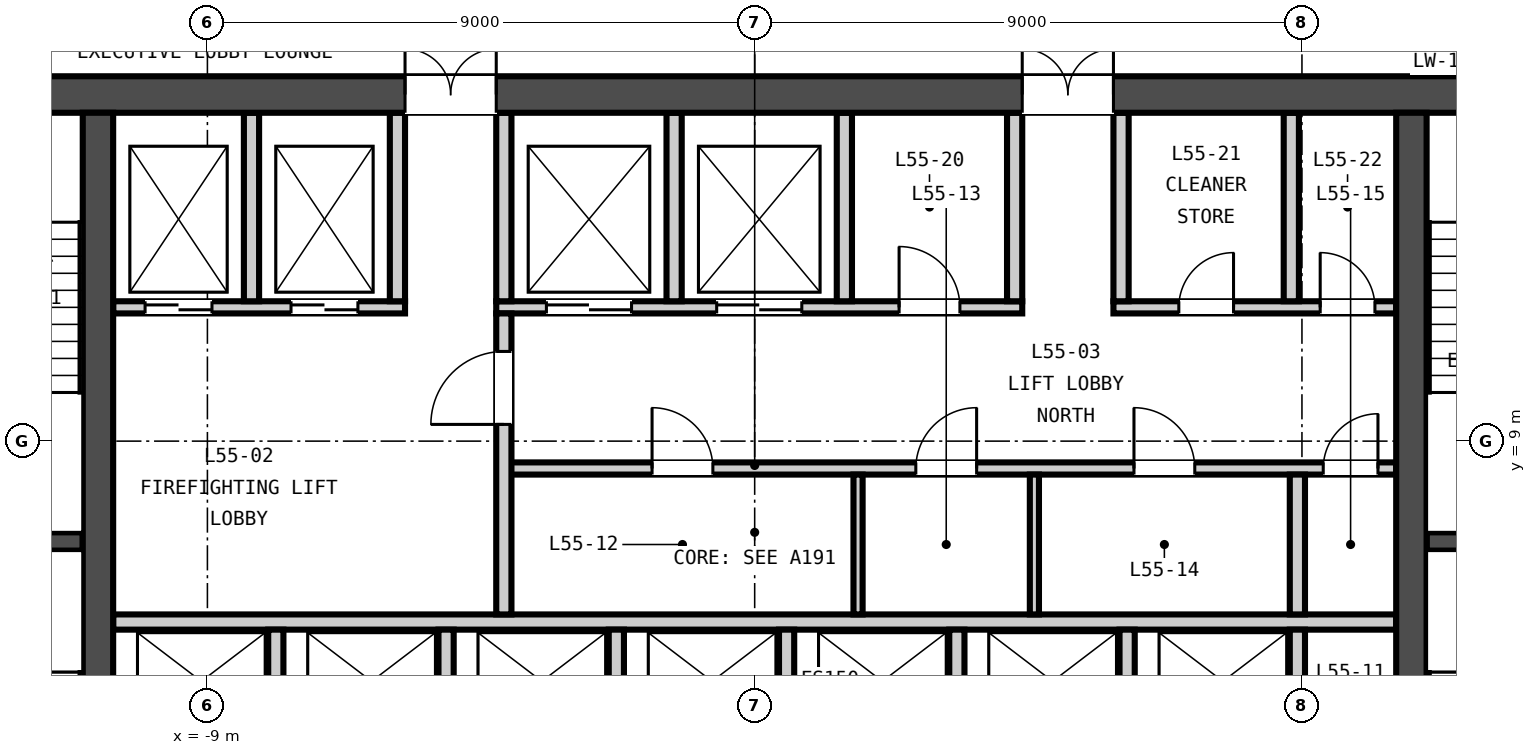
"""IFC4 building model, lengths in metres.
Left out: names, types, materials, properties, quantities, classifications, styles, units other than length and angle.
Written with IfcOpenShell. Run it as: python <this file> out.ifc"""

import sys

from ifc_helpers import new_model, si_unit, direction, frame, frame_2d, origin, place, context, subcontext, project, spatial, rectangle, extrude, element, fill, save


model = new_model("IFC4")
c1 = context("Model", 3, precision=1e-05, world=origin(), true_north=direction((0.0, 1.0)))
c2 = subcontext(c1, "Body", "Model", "MODEL_VIEW")
j1 = project(units=[si_unit("LENGTHUNIT", "METRE"), si_unit("PLANEANGLEUNIT", "RADIAN")], contexts=[c1])
p1 = place(None, origin())
s1 = spatial("IfcSite", under=j1, at=p1, CompositionType="ELEMENT")
p2 = place(p1, origin())
s2 = spatial("IfcBuilding", under=s1, at=p2, CompositionType="ELEMENT")
p3 = place(p2, frame((0.0, 0.0, 219.95)))
s3 = spatial("IfcBuildingStorey", under=s2, at=p3, CompositionType="ELEMENT", Elevation=219.95)
p4 = place(p3, frame((-15.0, 14.7, -0.15), z_axis=(0.0, 0.0, 1.0), x_axis=(1.0, 0.0, 0.0)))
e1 = element("IfcWall", 1, at=p4, inside=s3, PredefinedType="SOLIDWALL", context=c2, shape_type="SweptSolid", body=[
    extrude(rectangle(XDim=30.0, YDim=0.6, at=frame_2d((15.0, 0.0))), origin(), (0.0, 0.0, 1.0), 3.65),
])
p5 = place(p4, frame((9.25, 0.0, 0.15)))
e2 = element("IfcOpeningElement", 2, at=p5, cuts=e1, PredefinedType="OPENING", context=c2, shape_type="SweptSolid", body=[
    extrude(rectangle(XDim=1.5, YDim=2.1, at=frame_2d((0.75, 1.05))), frame((0.0, 0.31, 0.0), z_axis=(0.0, -1.0, 0.0), x_axis=(1.0, 0.0, 0.0)), (0.0, 0.0, 1.0), 0.62),
])
p6 = place(p4, frame((19.4, 0.0, 0.15)))
e3 = element("IfcOpeningElement", 3, at=p6, cuts=e1, PredefinedType="OPENING", context=c2, shape_type="SweptSolid", body=[
    extrude(rectangle(XDim=1.5, YDim=2.1, at=frame_2d((0.75, 1.05))), frame((0.0, 0.31, 0.0), z_axis=(0.0, -1.0, 0.0), x_axis=(1.0, 0.0, 0.0)), (0.0, 0.0, 1.0), 0.62),
])
p7 = place(p4, frame((1.5, 0.0, 0.15)))
e4 = element("IfcOpeningElement", 4, at=p7, cuts=e1, PredefinedType="OPENING", context=c2, shape_type="SweptSolid", body=[
    extrude(rectangle(XDim=1.2, YDim=2.1, at=frame_2d((0.6, 1.05))), frame((0.0, 0.31, 0.0), z_axis=(0.0, -1.0, 0.0), x_axis=(1.0, 0.0, 0.0)), (0.0, 0.0, 1.0), 0.62),
])
p8 = place(p4, frame((27.3, 0.0, 0.15)))
e5 = element("IfcOpeningElement", 5, at=p8, cuts=e1, PredefinedType="OPENING", context=c2, shape_type="SweptSolid", body=[
    extrude(rectangle(XDim=1.2, YDim=2.1, at=frame_2d((0.6, 1.05))), frame((0.0, 0.31, 0.0), z_axis=(0.0, -1.0, 0.0), x_axis=(1.0, 0.0, 0.0)), (0.0, 0.0, 1.0), 0.62),
])
for number, where, z_axis, x_axis in (
    (6, (-10.8, 0.6, -0.15), (0.0, 0.0, 1.0), (0.0, 1.0, 0.0)),
    (7, (10.8, 0.6, -0.15), (0.0, 0.0, 1.0), (0.0, 1.0, 0.0)),
):
    element("IfcWall", number, at=place(p3, frame(where, z_axis=z_axis, x_axis=x_axis)), inside=s3, PredefinedType="SOLIDWALL", context=c2, shape_type="SweptSolid", body=[
        extrude(rectangle(XDim=13.8, YDim=0.5, at=frame_2d((6.9, 0.0))), origin(), (0.0, 0.0, 1.0), 3.65),
    ])
p9 = place(p3, frame((-10.55, 6.025, 0.0), z_axis=(0.0, 0.0, 1.0), x_axis=(1.0, 0.0, 0.0)))
e8 = element("IfcWall", 8, at=p9, inside=s3, PredefinedType="PARTITIONING", context=c2, shape_type="SweptSolid", body=[
    extrude(rectangle(XDim=21.1, YDim=0.25, at=frame_2d((10.55, 0.0))), origin(), (0.0, 0.0, 1.0), 3.5),
])
p10 = place(p3, frame((-4.125, 8.55, 0.0), z_axis=(0.0, 0.0, 1.0), x_axis=(1.0, 0.0, 0.0)))
e9 = element("IfcWall", 9, at=p10, inside=s3, PredefinedType="PARTITIONING", context=c2, shape_type="SweptSolid", body=[
    extrude(rectangle(XDim=14.675, YDim=0.2, at=frame_2d((7.337, 0.0))), origin(), (0.0, 0.0, 1.0), 3.5),
])
p11 = place(p10, frame((2.438, 0.0, 0.0)))
e10 = element("IfcOpeningElement", 10, at=p11, cuts=e9, PredefinedType="OPENING", context=c2, shape_type="SweptSolid", body=[
    extrude(rectangle(XDim=1.0, YDim=2.1, at=frame_2d((0.5, 1.05))), frame((0.0, 0.11, 0.0), z_axis=(0.0, -1.0, 0.0), x_axis=(1.0, 0.0, 0.0)), (0.0, 0.0, 1.0), 0.22),
])
p12 = place(p10, frame((6.775, 0.0, 0.0)))
e11 = element("IfcOpeningElement", 11, at=p12, cuts=e9, PredefinedType="OPENING", context=c2, shape_type="SweptSolid", body=[
    extrude(rectangle(XDim=1.0, YDim=2.1, at=frame_2d((0.5, 1.05))), frame((0.0, 0.11, 0.0), z_axis=(0.0, -1.0, 0.0), x_axis=(1.0, 0.0, 0.0)), (0.0, 0.0, 1.0), 0.22),
])
p13 = place(p10, frame((10.363, 0.0, 0.0)))
e12 = element("IfcOpeningElement", 12, at=p13, cuts=e9, PredefinedType="OPENING", context=c2, shape_type="SweptSolid", body=[
    extrude(rectangle(XDim=1.0, YDim=2.1, at=frame_2d((0.5, 1.05))), frame((0.0, 0.11, 0.0), z_axis=(0.0, -1.0, 0.0), x_axis=(1.0, 0.0, 0.0)), (0.0, 0.0, 1.0), 0.22),
])
p14 = place(p10, frame((13.475, 0.0, 0.0)))
e13 = element("IfcOpeningElement", 13, at=p14, cuts=e9, PredefinedType="OPENING", context=c2, shape_type="SweptSolid", body=[
    extrude(rectangle(XDim=0.9, YDim=2.1, at=frame_2d((0.45, 1.05))), frame((0.0, 0.11, 0.0), z_axis=(0.0, -1.0, 0.0), x_axis=(1.0, 0.0, 0.0)), (0.0, 0.0, 1.0), 0.22),
])
p15 = place(p3, frame((-10.55, 11.2, 0.0), z_axis=(0.0, 0.0, 1.0), x_axis=(1.0, 0.0, 0.0)))
e14 = element("IfcWall", 14, at=p15, inside=s3, PredefinedType="PARTITIONING", context=c2, shape_type="SweptSolid", body=[
    extrude(rectangle(XDim=4.8, YDim=0.2, at=frame_2d((2.4, 0.0))), origin(), (0.0, 0.0, 1.0), 3.5),
])
p16 = place(p15, frame((0.525, 0.0, 0.0)))
e15 = element("IfcOpeningElement", 15, at=p16, cuts=e14, PredefinedType="OPENING", context=c2, shape_type="SweptSolid", body=[
    extrude(rectangle(XDim=1.1, YDim=2.1, at=frame_2d((0.55, 1.05))), frame((0.0, 0.11, 0.0), z_axis=(0.0, -1.0, 0.0), x_axis=(1.0, 0.0, 0.0)), (0.0, 0.0, 1.0), 0.22),
])
p17 = place(p15, frame((2.925, 0.0, 0.0)))
e16 = element("IfcOpeningElement", 16, at=p17, cuts=e14, PredefinedType="OPENING", context=c2, shape_type="SweptSolid", body=[
    extrude(rectangle(XDim=1.1, YDim=2.1, at=frame_2d((0.55, 1.05))), frame((0.0, 0.11, 0.0), z_axis=(0.0, -1.0, 0.0), x_axis=(1.0, 0.0, 0.0)), (0.0, 0.0, 1.0), 0.22),
])
p18 = place(p3, frame((-4.25, 11.2, 0.0), z_axis=(0.0, 0.0, 1.0), x_axis=(1.0, 0.0, 0.0)))
e17 = element("IfcWall", 17, at=p18, inside=s3, PredefinedType="PARTITIONING", context=c2, shape_type="SweptSolid", body=[
    extrude(rectangle(XDim=8.65, YDim=0.2, at=frame_2d((4.325, 0.0))), origin(), (0.0, 0.0, 1.0), 3.5),
])
p19 = place(p18, frame((0.825, 0.0, 0.0)))
e18 = element("IfcOpeningElement", 18, at=p19, cuts=e17, PredefinedType="OPENING", context=c2, shape_type="SweptSolid", body=[
    extrude(rectangle(XDim=1.4, YDim=2.1, at=frame_2d((0.7, 1.05))), frame((0.0, 0.11, 0.0), z_axis=(0.0, -1.0, 0.0), x_axis=(1.0, 0.0, 0.0)), (0.0, 0.0, 1.0), 0.22),
])
p20 = place(p18, frame((3.625, 0.0, 0.0)))
e19 = element("IfcOpeningElement", 19, at=p20, cuts=e17, PredefinedType="OPENING", context=c2, shape_type="SweptSolid", body=[
    extrude(rectangle(XDim=1.4, YDim=2.1, at=frame_2d((0.7, 1.05))), frame((0.0, 0.11, 0.0), z_axis=(0.0, -1.0, 0.0), x_axis=(1.0, 0.0, 0.0)), (0.0, 0.0, 1.0), 0.22),
])
p21 = place(p18, frame((6.625, 0.0, 0.0)))
e20 = element("IfcOpeningElement", 20, at=p21, cuts=e17, PredefinedType="OPENING", context=c2, shape_type="SweptSolid", body=[
    extrude(rectangle(XDim=1.0, YDim=2.1, at=frame_2d((0.5, 1.05))), frame((0.0, 0.11, 0.0), z_axis=(0.0, -1.0, 0.0), x_axis=(1.0, 0.0, 0.0)), (0.0, 0.0, 1.0), 0.22),
])
p22 = place(p3, frame((5.9, 11.2, 0.0), z_axis=(0.0, 0.0, 1.0), x_axis=(1.0, 0.0, 0.0)))
e21 = element("IfcWall", 21, at=p22, inside=s3, PredefinedType="PARTITIONING", context=c2, shape_type="SweptSolid", body=[
    extrude(rectangle(XDim=4.65, YDim=0.2, at=frame_2d((2.325, 0.0))), origin(), (0.0, 0.0, 1.0), 3.5),
])
p23 = place(p22, frame((1.075, 0.0, 0.0)))
e22 = element("IfcOpeningElement", 22, at=p23, cuts=e21, PredefinedType="OPENING", context=c2, shape_type="SweptSolid", body=[
    extrude(rectangle(XDim=0.9, YDim=2.1, at=frame_2d((0.45, 1.05))), frame((0.0, 0.11, 0.0), z_axis=(0.0, -1.0, 0.0), x_axis=(1.0, 0.0, 0.0)), (0.0, 0.0, 1.0), 0.22),
])
p24 = place(p22, frame((3.4, 0.0, 0.0)))
e23 = element("IfcOpeningElement", 23, at=p24, cuts=e21, PredefinedType="OPENING", context=c2, shape_type="SweptSolid", body=[
    extrude(rectangle(XDim=0.9, YDim=2.1, at=frame_2d((0.45, 1.05))), frame((0.0, 0.11, 0.0), z_axis=(0.0, -1.0, 0.0), x_axis=(1.0, 0.0, 0.0)), (0.0, 0.0, 1.0), 0.22),
])
p25 = place(p3, frame((-4.125, 6.15, 0.0), z_axis=(0.0, 0.0, 1.0), x_axis=(0.0, 1.0, 0.0)))
e24 = element("IfcWall", 24, at=p25, inside=s3, PredefinedType="PARTITIONING", context=c2, shape_type="SweptSolid", body=[
    extrude(rectangle(XDim=4.95, YDim=0.25, at=frame_2d((2.475, 0.0))), origin(), (0.0, 0.0, 1.0), 3.5),
])
p26 = place(p25, frame((3.125, 0.0, 0.0)))
e25 = element("IfcOpeningElement", 25, at=p26, cuts=e24, PredefinedType="OPENING", context=c2, shape_type="SweptSolid", body=[
    extrude(rectangle(XDim=1.2, YDim=2.1, at=frame_2d((0.6, 1.05))), frame((0.0, 0.135, 0.0), z_axis=(0.0, -1.0, 0.0), x_axis=(1.0, 0.0, 0.0)), (0.0, 0.0, 1.0), 0.27),
])
for number, where, z_axis, x_axis in (
    (26, (-7.875, 3.6, 0.0), (0.0, 0.0, 1.0), (0.0, 1.0, 0.0)),
    (27, (-5.075, 3.6, 0.0), (0.0, 0.0, 1.0), (0.0, 1.0, 0.0)),
    (28, (-2.275, 3.6, 0.0), (0.0, 0.0, 1.0), (0.0, 1.0, 0.0)),
    (29, (0.525, 3.6, 0.0), (0.0, 0.0, 1.0), (0.0, 1.0, 0.0)),
    (30, (3.325, 3.6, 0.0), (0.0, 0.0, 1.0), (0.0, 1.0, 0.0)),
    (31, (6.125, 3.6, 0.0), (0.0, 0.0, 1.0), (0.0, 1.0, 0.0)),
    (32, (8.925, 3.6, 0.0), (0.0, 0.0, 1.0), (0.0, 1.0, 0.0)),
):
    element("IfcWall", number, at=place(p3, frame(where, z_axis=z_axis, x_axis=x_axis)), inside=s3, PredefinedType="PARTITIONING", context=c2, shape_type="SweptSolid", body=[
        extrude(rectangle(XDim=2.3, YDim=0.25, at=frame_2d((1.15, 0.0))), origin(), (0.0, 0.0, 1.0), 3.5),
    ])
for number, where, z_axis, x_axis in (
    (33, (1.7, 6.15, 0.0), (0.0, 0.0, 1.0), (0.0, 1.0, 0.0)),
    (34, (4.6, 6.15, 0.0), (0.0, 0.0, 1.0), (0.0, 1.0, 0.0)),
):
    element("IfcWall", number, at=place(p3, frame(where, z_axis=z_axis, x_axis=x_axis)), inside=s3, PredefinedType="PARTITIONING", context=c2, shape_type="SweptSolid", body=[
        extrude(rectangle(XDim=2.3, YDim=0.15, at=frame_2d((1.15, 0.0))), origin(), (0.0, 0.0, 1.0), 3.5),
    ])
p27 = place(p3, frame((8.925, 6.15, 0.0), z_axis=(0.0, 0.0, 1.0), x_axis=(0.0, 1.0, 0.0)))
e35 = element("IfcWall", 35, at=p27, inside=s3, PredefinedType="PARTITIONING", context=c2, shape_type="SweptSolid", body=[
    extrude(rectangle(XDim=2.3, YDim=0.25, at=frame_2d((1.15, 0.0))), origin(), (0.0, 0.0, 1.0), 3.5),
])
for number, where, z_axis, x_axis in (
    (36, (-8.275, 11.3, 0.0), (0.0, 0.0, 1.0), (0.0, 1.0, 0.0)),
    (37, (-5.875, 11.3, 0.0), (0.0, 0.0, 1.0), (0.0, 1.0, 0.0)),
    (38, (-4.125, 11.3, 0.0), (0.0, 0.0, 1.0), (0.0, 1.0, 0.0)),
    (39, (-1.325, 11.3, 0.0), (0.0, 0.0, 1.0), (0.0, 1.0, 0.0)),
    (40, (1.475, 11.3, 0.0), (0.0, 0.0, 1.0), (0.0, 1.0, 0.0)),
    (41, (4.275, 11.3, 0.0), (0.0, 0.0, 1.0), (0.0, 1.0, 0.0)),
    (42, (6.025, 11.3, 0.0), (0.0, 0.0, 1.0), (0.0, 1.0, 0.0)),
    (43, (8.825, 11.3, 0.0), (0.0, 0.0, 1.0), (0.0, 1.0, 0.0)),
):
    element("IfcWall", number, at=place(p3, frame(where, z_axis=z_axis, x_axis=x_axis)), inside=s3, PredefinedType="PARTITIONING", context=c2, shape_type="SweptSolid", body=[
        extrude(rectangle(XDim=3.1, YDim=0.25, at=frame_2d((1.55, 0.0))), origin(), (0.0, 0.0, 1.0), 3.5),
    ])
for number, where, z_axis, x_axis in (
    (44, (-14.0, 7.35, 0.0), (0.0, 0.0, 1.0), (1.0, 0.0, 0.0)),
    (45, (11.05, 7.35, 0.0), (0.0, 0.0, 1.0), (1.0, 0.0, 0.0)),
):
    element("IfcWall", number, at=place(p3, frame(where, z_axis=z_axis, x_axis=x_axis)), inside=s3, PredefinedType="SOLIDWALL", context=c2, shape_type="SweptSolid", body=[
        extrude(rectangle(XDim=2.95, YDim=0.3, at=frame_2d((1.475, 0.0))), origin(), (0.0, 0.0, 1.0), 3.5),
    ])
p28 = place(p26, origin())
e46 = element("IfcDoor", 46, at=p28, inside=s3, OperationType="SINGLE_SWING_LEFT", PredefinedType="DOOR", context=c2, shape_type="SweptSolid", body=[
    extrude(rectangle(XDim=1.2, YDim=2.1, at=frame_2d((0.6, 1.05))), frame((0.0, 0.025, 0.0), z_axis=(0.0, -1.0, 0.0), x_axis=(1.0, 0.0, 0.0)), (0.0, 0.0, 1.0), 0.05),
])
fill(e25, e46)
p29 = place(p11, origin())
e47 = element("IfcDoor", 47, at=p29, inside=s3, OperationType="SINGLE_SWING_LEFT", PredefinedType="DOOR", context=c2, shape_type="SweptSolid", body=[
    extrude(rectangle(XDim=1.0, YDim=2.1, at=frame_2d((0.5, 1.05))), frame((0.0, 0.025, 0.0), z_axis=(0.0, -1.0, 0.0), x_axis=(1.0, 0.0, 0.0)), (0.0, 0.0, 1.0), 0.05),
])
fill(e10, e47)
p30 = place(p12, origin())
e48 = element("IfcDoor", 48, at=p30, inside=s3, OperationType="SINGLE_SWING_RIGHT", PredefinedType="DOOR", context=c2, shape_type="SweptSolid", body=[
    extrude(rectangle(XDim=1.0, YDim=2.1, at=frame_2d((0.5, 1.05))), frame((0.0, 0.025, 0.0), z_axis=(0.0, -1.0, 0.0), x_axis=(1.0, 0.0, 0.0)), (0.0, 0.0, 1.0), 0.05),
])
fill(e11, e48)
p31 = place(p13, origin())
e49 = element("IfcDoor", 49, at=p31, inside=s3, OperationType="SINGLE_SWING_LEFT", PredefinedType="DOOR", context=c2, shape_type="SweptSolid", body=[
    extrude(rectangle(XDim=1.0, YDim=2.1, at=frame_2d((0.5, 1.05))), frame((0.0, 0.025, 0.0), z_axis=(0.0, -1.0, 0.0), x_axis=(1.0, 0.0, 0.0)), (0.0, 0.0, 1.0), 0.05),
])
fill(e12, e49)
p32 = place(p14, origin())
e50 = element("IfcDoor", 50, at=p32, inside=s3, OperationType="SINGLE_SWING_RIGHT", PredefinedType="DOOR", context=c2, shape_type="SweptSolid", body=[
    extrude(rectangle(XDim=0.9, YDim=2.1, at=frame_2d((0.45, 1.05))), frame((0.0, 0.025, 0.0), z_axis=(0.0, -1.0, 0.0), x_axis=(1.0, 0.0, 0.0)), (0.0, 0.0, 1.0), 0.05),
])
fill(e13, e50)
p33 = place(p16, origin())
e51 = element("IfcDoor", 51, at=p33, inside=s3, OperationType="DOUBLE_DOOR_SLIDING", PredefinedType="DOOR", context=c2, shape_type="SweptSolid", body=[
    extrude(rectangle(XDim=1.1, YDim=2.1, at=frame_2d((0.55, 1.05))), frame((0.0, 0.025, 0.0), z_axis=(0.0, -1.0, 0.0), x_axis=(1.0, 0.0, 0.0)), (0.0, 0.0, 1.0), 0.05),
])
fill(e15, e51)
p34 = place(p17, origin())
e52 = element("IfcDoor", 52, at=p34, inside=s3, OperationType="DOUBLE_DOOR_SLIDING", PredefinedType="DOOR", context=c2, shape_type="SweptSolid", body=[
    extrude(rectangle(XDim=1.1, YDim=2.1, at=frame_2d((0.55, 1.05))), frame((0.0, 0.025, 0.0), z_axis=(0.0, -1.0, 0.0), x_axis=(1.0, 0.0, 0.0)), (0.0, 0.0, 1.0), 0.05),
])
fill(e16, e52)
p35 = place(p19, origin())
e53 = element("IfcDoor", 53, at=p35, inside=s3, OperationType="DOUBLE_DOOR_SLIDING", PredefinedType="DOOR", context=c2, shape_type="SweptSolid", body=[
    extrude(rectangle(XDim=1.4, YDim=2.1, at=frame_2d((0.7, 1.05))), frame((0.0, 0.025, 0.0), z_axis=(0.0, -1.0, 0.0), x_axis=(1.0, 0.0, 0.0)), (0.0, 0.0, 1.0), 0.05),
])
fill(e18, e53)
p36 = place(p20, origin())
e54 = element("IfcDoor", 54, at=p36, inside=s3, OperationType="DOUBLE_DOOR_SLIDING", PredefinedType="DOOR", context=c2, shape_type="SweptSolid", body=[
    extrude(rectangle(XDim=1.4, YDim=2.1, at=frame_2d((0.7, 1.05))), frame((0.0, 0.025, 0.0), z_axis=(0.0, -1.0, 0.0), x_axis=(1.0, 0.0, 0.0)), (0.0, 0.0, 1.0), 0.05),
])
fill(e19, e54)
p37 = place(p21, origin())
e55 = element("IfcDoor", 55, at=p37, inside=s3, OperationType="SINGLE_SWING_LEFT", PredefinedType="DOOR", context=c2, shape_type="SweptSolid", body=[
    extrude(rectangle(XDim=1.0, YDim=2.1, at=frame_2d((0.5, 1.05))), frame((0.0, 0.025, 0.0), z_axis=(0.0, -1.0, 0.0), x_axis=(1.0, 0.0, 0.0)), (0.0, 0.0, 1.0), 0.05),
])
fill(e20, e55)
p38 = place(p23, origin())
e56 = element("IfcDoor", 56, at=p38, inside=s3, OperationType="SINGLE_SWING_RIGHT", PredefinedType="DOOR", context=c2, shape_type="SweptSolid", body=[
    extrude(rectangle(XDim=0.9, YDim=2.1, at=frame_2d((0.45, 1.05))), frame((0.0, 0.025, 0.0), z_axis=(0.0, -1.0, 0.0), x_axis=(1.0, 0.0, 0.0)), (0.0, 0.0, 1.0), 0.05),
])
fill(e22, e56)
p39 = place(p24, origin())
e57 = element("IfcDoor", 57, at=p39, inside=s3, OperationType="SINGLE_SWING_LEFT", PredefinedType="DOOR", context=c2, shape_type="SweptSolid", body=[
    extrude(rectangle(XDim=0.9, YDim=2.1, at=frame_2d((0.45, 1.05))), frame((0.0, 0.025, 0.0), z_axis=(0.0, -1.0, 0.0), x_axis=(1.0, 0.0, 0.0)), (0.0, 0.0, 1.0), 0.05),
])
fill(e23, e57)
p40 = place(p5, origin())
e58 = element("IfcDoor", 58, at=p40, inside=s3, OperationType="DOUBLE_DOOR_SINGLE_SWING", PredefinedType="DOOR", context=c2, shape_type="SweptSolid", body=[
    extrude(rectangle(XDim=1.5, YDim=2.1, at=frame_2d((0.75, 1.05))), frame((0.0, 0.025, 0.0), z_axis=(0.0, -1.0, 0.0), x_axis=(1.0, 0.0, 0.0)), (0.0, 0.0, 1.0), 0.05),
])
fill(e2, e58)
p41 = place(p6, origin())
e59 = element("IfcDoor", 59, at=p41, inside=s3, OperationType="DOUBLE_DOOR_SINGLE_SWING", PredefinedType="DOOR", context=c2, shape_type="SweptSolid", body=[
    extrude(rectangle(XDim=1.5, YDim=2.1, at=frame_2d((0.75, 1.05))), frame((0.0, 0.025, 0.0), z_axis=(0.0, -1.0, 0.0), x_axis=(1.0, 0.0, 0.0)), (0.0, 0.0, 1.0), 0.05),
])
fill(e3, e59)
save(model, sys.argv[1])
